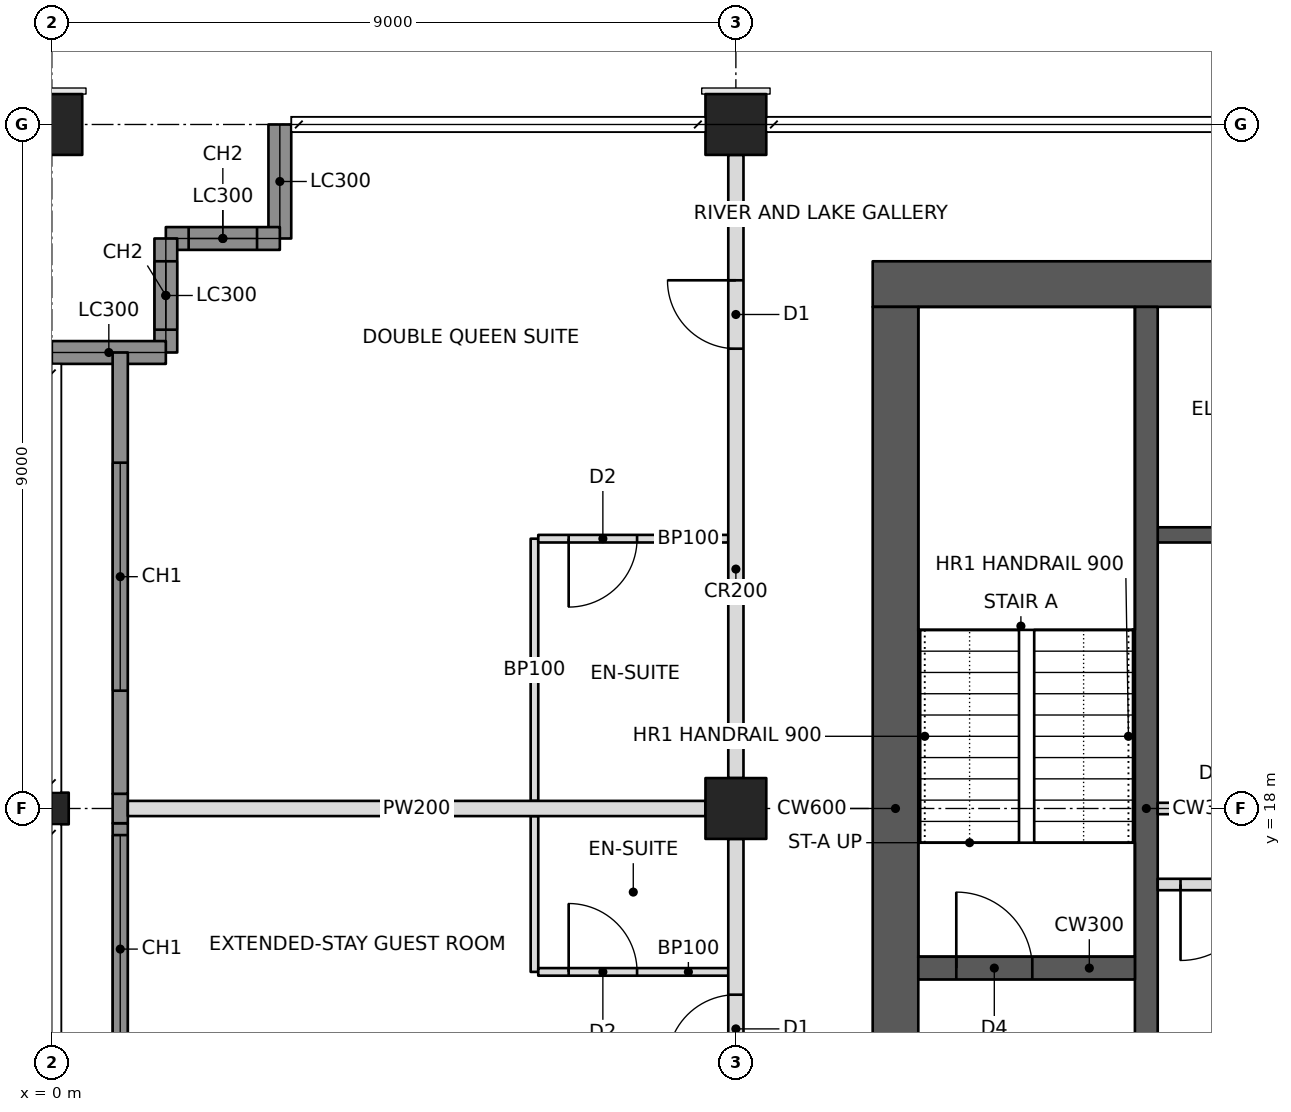
"""IFC4 building model, lengths in metres.
Left out: names, types, materials, properties, quantities, classifications, styles, units other than length and angle.
Written with IfcOpenShell. Run it as: python <this file> out.ifc"""

import sys

from ifc_helpers import new_model, si_unit, direction, frame, frame_2d, origin, origin_2d, place, context, subcontext, project, spatial, rectangle, hollow_rectangle, i_section, extrude, element, fill, save


model = new_model("IFC4")
c1 = context("Model", 3, precision=1e-05, world=origin(), true_north=direction((0.0, 1.0)))
c2 = subcontext(c1, "Body", "Model", "MODEL_VIEW")
j1 = project(units=[si_unit("LENGTHUNIT", "METRE"), si_unit("PLANEANGLEUNIT", "RADIAN")], contexts=[c1])
p1 = place(None, origin())
s1 = spatial("IfcSite", under=j1, at=p1, CompositionType="ELEMENT")
p2 = place(p1, origin())
s2 = spatial("IfcBuilding", under=s1, at=p2, CompositionType="ELEMENT")
p3 = place(p2, frame((0.0, 0.0, 255.4)))
s3 = spatial("IfcBuildingStorey", under=s2, at=p3, CompositionType="ELEMENT", Elevation=255.4)
p4 = place(p3, frame((0.0, 18.0, 0.0), z_axis=(0.0, 0.0, 1.0), x_axis=(0.0, 1.0, 0.0)))
e1 = element("IfcColumn", 1, at=p4, inside=s3, PredefinedType="COLUMN", context=c2, shape_type="SweptSolid", body=[
    extrude(i_section(OverallWidth=0.417, OverallDepth=0.445, WebThickness=0.039, FlangeThickness=0.063, at=origin_2d()), origin(), (0.0, 0.0, 1.0), 3.6),
])
for number, where, z_axis, x_axis in (
    (2, (0.0, 27.0, 0.0), (0.0, 0.0, 1.0), (0.0, 1.0, 0.0)),
    (3, (9.0, 18.0, 0.0), (0.0, 0.0, 1.0), (1.0, 0.0, 0.0)),
    (4, (9.0, 27.0, 0.0), (0.0, 0.0, 1.0), (1.0, 0.0, 0.0)),
):
    element("IfcColumn", number, at=place(p3, frame(where, z_axis=z_axis, x_axis=x_axis)), inside=s3, PredefinedType="COLUMN", context=c2, shape_type="SweptSolid", body=[
        extrude(hollow_rectangle(XDim=0.8, YDim=0.8, WallThickness=0.032, at=origin_2d()), origin(), (0.0, 0.0, 1.0), 3.6),
    ])
p5 = place(p3, frame((10.8, 24.9, 0.0), z_axis=(0.0, 0.0, 1.0), x_axis=(1.0, 0.0, 0.0)))
e5 = element("IfcWall", 5, at=p5, inside=s3, PredefinedType="SHEAR", context=c2, shape_type="SweptSolid", body=[
    extrude(rectangle(XDim=23.4, YDim=0.6, at=frame_2d((11.7, 0.0))), origin(), (0.0, 0.0, 1.0), 3.6),
])
p6 = place(p5, frame((17.2, 0.0, 0.0)))
e6 = element("IfcOpeningElement", 6, at=p6, cuts=e5, PredefinedType="OPENING", context=c2, shape_type="SweptSolid", body=[
    extrude(rectangle(XDim=1.8, YDim=2.1, at=frame_2d((0.9, 1.05))), frame((0.0, 0.31, 0.0), z_axis=(0.0, -1.0, 0.0), x_axis=(1.0, 0.0, 0.0)), (0.0, 0.0, 1.0), 0.62),
])
p7 = place(p5, frame((21.1, 0.0, 0.0)))
e7 = element("IfcOpeningElement", 7, at=p7, cuts=e5, PredefinedType="OPENING", context=c2, shape_type="SweptSolid", body=[
    extrude(rectangle(XDim=1.0, YDim=2.1, at=frame_2d((0.5, 1.05))), frame((0.0, 0.31, 0.0), z_axis=(0.0, -1.0, 0.0), x_axis=(1.0, 0.0, 0.0)), (0.0, 0.0, 1.0), 0.62),
])
p8 = place(p5, frame((4.9, 0.0, 0.0)))
e8 = element("IfcOpeningElement", 8, at=p8, cuts=e5, PredefinedType="OPENING", context=c2, shape_type="SweptSolid", body=[
    extrude(rectangle(XDim=1.0, YDim=2.1, at=frame_2d((0.5, 1.05))), frame((0.0, 0.31, 0.0), z_axis=(0.0, -1.0, 0.0), x_axis=(1.0, 0.0, 0.0)), (0.0, 0.0, 1.0), 0.62),
])
p9 = place(p3, frame((11.1, 11.4, 0.0), z_axis=(0.0, 0.0, 1.0), x_axis=(0.0, 1.0, 0.0)))
e9 = element("IfcWall", 9, at=p9, inside=s3, PredefinedType="SHEAR", context=c2, shape_type="SweptSolid", body=[
    extrude(rectangle(XDim=13.2, YDim=0.6, at=frame_2d((6.6, 0.0))), origin(), (0.0, 0.0, 1.0), 3.6),
])
p10 = place(p3, frame((14.4, 11.4, 0.0), z_axis=(0.0, 0.0, 1.0), x_axis=(0.0, 1.0, 0.0)))
e10 = element("IfcWall", 10, at=p10, inside=s3, PredefinedType="SHEAR", context=c2, shape_type="SweptSolid", body=[
    extrude(rectangle(XDim=13.2, YDim=0.3, at=frame_2d((6.6, 0.0))), origin(), (0.0, 0.0, 1.0), 3.6),
])
p11 = place(p3, frame((11.4, 15.9, 0.0), z_axis=(0.0, 0.0, 1.0), x_axis=(1.0, 0.0, 0.0)))
e11 = element("IfcWall", 11, at=p11, inside=s3, PredefinedType="SHEAR", context=c2, shape_type="SweptSolid", body=[
    extrude(rectangle(XDim=2.85, YDim=0.3, at=frame_2d((1.425, 0.0))), origin(), (0.0, 0.0, 1.0), 3.6),
])
p12 = place(p11, frame((0.5, 0.0, 0.0)))
e12 = element("IfcOpeningElement", 12, at=p12, cuts=e11, PredefinedType="OPENING", context=c2, shape_type="SweptSolid", body=[
    extrude(rectangle(XDim=1.0, YDim=2.1, at=frame_2d((0.5, 1.05))), frame((0.0, 0.16, 0.0), z_axis=(0.0, -1.0, 0.0), x_axis=(1.0, 0.0, 0.0)), (0.0, 0.0, 1.0), 0.32),
])
p13 = place(p3, frame((14.55, 18.0, 0.0), z_axis=(0.0, 0.0, 1.0), x_axis=(1.0, 0.0, 0.0)))
e13 = element("IfcWall", 13, at=p13, inside=s3, PredefinedType="PARTITIONING", context=c2, shape_type="SweptSolid", body=[
    extrude(rectangle(XDim=3.3, YDim=0.15, at=frame_2d((1.65, 0.0))), origin(), (0.0, 0.0, 1.0), 3.4),
])
p14 = place(p3, frame((14.55, 21.6, 0.0), z_axis=(0.0, 0.0, 1.0), x_axis=(1.0, 0.0, 0.0)))
e14 = element("IfcWall", 14, at=p14, inside=s3, PredefinedType="SHEAR", context=c2, shape_type="SweptSolid", body=[
    extrude(rectangle(XDim=3.3, YDim=0.2, at=frame_2d((1.65, 0.0))), origin(), (0.0, 0.0, 1.0), 3.6),
])
p15 = place(p3, frame((3.0, 27.0, 0.0), z_axis=(0.0, 0.0, 1.0), x_axis=(0.0, -1.0, 0.0)))
e15 = element("IfcWall", 15, at=p15, inside=s3, PredefinedType="SOLIDWALL", context=c2, shape_type="SweptSolid", body=[
    extrude(rectangle(XDim=1.5, YDim=0.3, at=frame_2d((0.75, 0.0))), origin(), (0.0, 0.0, 1.0), 2.62),
])
p16 = place(p3, frame((3.0, 25.5, 0.0), z_axis=(0.0, 0.0, 1.0), x_axis=(-1.0, 0.0, 0.0)))
e16 = element("IfcWall", 16, at=p16, inside=s3, PredefinedType="SOLIDWALL", context=c2, shape_type="SweptSolid", body=[
    extrude(rectangle(XDim=1.5, YDim=0.3, at=frame_2d((0.75, 0.0))), origin(), (0.0, 0.0, 1.0), 3.4),
])
p17 = place(p16, frame((0.3, 0.0, 0.6)))
e17 = element("IfcOpeningElement", 17, at=p17, cuts=e16, PredefinedType="OPENING", context=c2, shape_type="SweptSolid", body=[
    extrude(rectangle(XDim=0.9, YDim=2.2, at=frame_2d((0.45, 1.1))), frame((0.0, 0.16, 0.0), z_axis=(0.0, -1.0, 0.0), x_axis=(1.0, 0.0, 0.0)), (0.0, 0.0, 1.0), 0.32),
])
p18 = place(p3, frame((1.5, 25.5, 0.0), z_axis=(0.0, 0.0, 1.0), x_axis=(0.0, -1.0, 0.0)))
e18 = element("IfcWall", 18, at=p18, inside=s3, PredefinedType="SOLIDWALL", context=c2, shape_type="SweptSolid", body=[
    extrude(rectangle(XDim=1.5, YDim=0.3, at=frame_2d((0.75, 0.0))), origin(), (0.0, 0.0, 1.0), 3.4),
])
p19 = place(p18, frame((0.3, 0.0, 0.6)))
e19 = element("IfcOpeningElement", 19, at=p19, cuts=e18, PredefinedType="OPENING", context=c2, shape_type="SweptSolid", body=[
    extrude(rectangle(XDim=0.9, YDim=2.2, at=frame_2d((0.45, 1.1))), frame((0.0, 0.16, 0.0), z_axis=(0.0, -1.0, 0.0), x_axis=(1.0, 0.0, 0.0)), (0.0, 0.0, 1.0), 0.32),
])
p20 = place(p3, frame((1.5, 24.0, 0.0), z_axis=(0.0, 0.0, 1.0), x_axis=(-1.0, 0.0, 0.0)))
e20 = element("IfcWall", 20, at=p20, inside=s3, PredefinedType="SOLIDWALL", context=c2, shape_type="SweptSolid", body=[
    extrude(rectangle(XDim=1.5, YDim=0.3, at=frame_2d((0.75, 0.0))), origin(), (0.0, 0.0, 1.0), 2.62),
])
p21 = place(p3, frame((9.0, 10.8, 0.0), z_axis=(0.0, 0.0, 1.0), x_axis=(0.0, 1.0, 0.0)))
e21 = element("IfcWall", 21, at=p21, inside=s3, PredefinedType="PARTITIONING", context=c2, shape_type="SweptSolid", body=[
    extrude(rectangle(XDim=6.8, YDim=0.2, at=frame_2d((3.4, 0.0))), origin(), (0.0, 0.0, 1.0), 2.605),
])
p22 = place(p21, frame((0.25, 0.0, 0.0)))
e22 = element("IfcOpeningElement", 22, at=p22, cuts=e21, PredefinedType="OPENING", context=c2, shape_type="SweptSolid", body=[
    extrude(rectangle(XDim=0.9, YDim=2.1, at=frame_2d((0.45, 1.05))), frame((0.0, 0.11, 0.0), z_axis=(0.0, -1.0, 0.0), x_axis=(1.0, 0.0, 0.0)), (0.0, 0.0, 1.0), 0.22),
])
p23 = place(p21, frame((3.85, 0.0, 0.0)))
e23 = element("IfcOpeningElement", 23, at=p23, cuts=e21, PredefinedType="OPENING", context=c2, shape_type="SweptSolid", body=[
    extrude(rectangle(XDim=0.9, YDim=2.1, at=frame_2d((0.45, 1.05))), frame((0.0, 0.11, 0.0), z_axis=(0.0, -1.0, 0.0), x_axis=(1.0, 0.0, 0.0)), (0.0, 0.0, 1.0), 0.22),
])
p24 = place(p3, frame((9.0, 18.4, 0.0), z_axis=(0.0, 0.0, 1.0), x_axis=(0.0, 1.0, 0.0)))
e24 = element("IfcWall", 24, at=p24, inside=s3, PredefinedType="PARTITIONING", context=c2, shape_type="SweptSolid", body=[
    extrude(rectangle(XDim=8.2, YDim=0.2, at=frame_2d((4.1, 0.0))), origin(), (0.0, 0.0, 1.0), 2.605),
])
p25 = place(p24, frame((5.65, 0.0, 0.0)))
e25 = element("IfcOpeningElement", 25, at=p25, cuts=e24, PredefinedType="OPENING", context=c2, shape_type="SweptSolid", body=[
    extrude(rectangle(XDim=0.9, YDim=2.1, at=frame_2d((0.45, 1.05))), frame((0.0, 0.11, 0.0), z_axis=(0.0, -1.0, 0.0), x_axis=(1.0, 0.0, 0.0)), (0.0, 0.0, 1.0), 0.22),
])
p26 = place(p3, frame((8.6, 18.0, 0.0), z_axis=(0.0, 0.0, 1.0), x_axis=(-1.0, 0.0, 0.0)))
e26 = element("IfcWall", 26, at=p26, inside=s3, PredefinedType="PARTITIONING", context=c2, shape_type="SweptSolid", body=[
    extrude(rectangle(XDim=7.6, YDim=0.2, at=frame_2d((3.8, 0.0))), origin(), (0.0, 0.0, 1.0), 2.605),
])
p27 = place(p3, frame((6.35, 15.85, 0.0), z_axis=(0.0, 0.0, 1.0), x_axis=(0.0, 1.0, 0.0)))
e27 = element("IfcWall", 27, at=p27, inside=s3, PredefinedType="PARTITIONING", context=c2, shape_type="SweptSolid", body=[
    extrude(rectangle(XDim=2.05, YDim=0.1, at=frame_2d((1.025, 0.0))), origin(), (0.0, 0.0, 1.0), 2.604),
])
p28 = place(p3, frame((8.9, 15.85, 0.0), z_axis=(0.0, 0.0, 1.0), x_axis=(-1.0, 0.0, 0.0)))
e28 = element("IfcWall", 28, at=p28, inside=s3, PredefinedType="PARTITIONING", context=c2, shape_type="SweptSolid", body=[
    extrude(rectangle(XDim=2.5, YDim=0.1, at=frame_2d((1.25, 0.0))), origin(), (0.0, 0.0, 1.0), 2.604),
])
p29 = place(p28, frame((1.2, 0.0, 0.0)))
e29 = element("IfcOpeningElement", 29, at=p29, cuts=e28, PredefinedType="OPENING", context=c2, shape_type="SweptSolid", body=[
    extrude(rectangle(XDim=0.9, YDim=2.1, at=frame_2d((0.45, 1.05))), frame((0.0, 0.06, 0.0), z_axis=(0.0, -1.0, 0.0), x_axis=(1.0, 0.0, 0.0)), (0.0, 0.0, 1.0), 0.12),
])
p30 = place(p3, frame((6.35, 18.1, 0.0), z_axis=(0.0, 0.0, 1.0), x_axis=(0.0, 1.0, 0.0)))
e30 = element("IfcWall", 30, at=p30, inside=s3, PredefinedType="PARTITIONING", context=c2, shape_type="SweptSolid", body=[
    extrude(rectangle(XDim=3.45, YDim=0.1, at=frame_2d((1.725, 0.0))), origin(), (0.0, 0.0, 1.0), 2.604),
])
p31 = place(p3, frame((8.9, 21.55, 0.0), z_axis=(0.0, 0.0, 1.0), x_axis=(-1.0, 0.0, 0.0)))
e31 = element("IfcWall", 31, at=p31, inside=s3, PredefinedType="PARTITIONING", context=c2, shape_type="SweptSolid", body=[
    extrude(rectangle(XDim=2.5, YDim=0.1, at=frame_2d((1.25, 0.0))), origin(), (0.0, 0.0, 1.0), 2.604),
])
p32 = place(p31, frame((1.2, 0.0, 0.0)))
e32 = element("IfcOpeningElement", 32, at=p32, cuts=e31, PredefinedType="OPENING", context=c2, shape_type="SweptSolid", body=[
    extrude(rectangle(XDim=0.9, YDim=2.1, at=frame_2d((0.45, 1.05))), frame((0.0, 0.06, 0.0), z_axis=(0.0, -1.0, 0.0), x_axis=(1.0, 0.0, 0.0)), (0.0, 0.0, 1.0), 0.12),
])
p33 = place(p3, frame((14.55, 17.0, 0.0), z_axis=(0.0, 0.0, 1.0), x_axis=(1.0, 0.0, 0.0)))
e33 = element("IfcWall", 33, at=p33, inside=s3, PredefinedType="PARTITIONING", context=c2, shape_type="SweptSolid", body=[
    extrude(rectangle(XDim=3.3, YDim=0.15, at=frame_2d((1.65, 0.0))), origin(), (0.0, 0.0, 1.0), 3.4),
])
p34 = place(p33, frame((0.3, 0.0, 0.0)))
e34 = element("IfcOpeningElement", 34, at=p34, cuts=e33, PredefinedType="OPENING", context=c2, shape_type="SweptSolid", body=[
    extrude(rectangle(XDim=1.0, YDim=2.1, at=frame_2d((0.5, 1.05))), frame((0.0, 0.085, 0.0), z_axis=(0.0, -1.0, 0.0), x_axis=(1.0, 0.0, 0.0)), (0.0, 0.0, 1.0), 0.17),
])
p35 = place(p3, frame((0.9, 9.135, 0.0), z_axis=(0.0, 0.0, 1.0), x_axis=(0.0, 1.0, 0.0)))
e35 = element("IfcWall", 35, at=p35, inside=s3, PredefinedType="SOLIDWALL", context=c2, shape_type="SweptSolid", body=[
    extrude(rectangle(XDim=8.671, YDim=0.2, at=frame_2d((4.335, 0.0))), origin(), (0.0, 0.0, 1.0), 3.4),
])
p36 = place(p35, frame((2.015, 0.0, 0.6)))
e36 = element("IfcOpeningElement", 36, at=p36, cuts=e35, PredefinedType="OPENING", context=c2, shape_type="SweptSolid", body=[
    extrude(rectangle(XDim=3.0, YDim=2.2, at=frame_2d((1.5, 1.1))), frame((0.0, 0.11, 0.0), z_axis=(0.0, -1.0, 0.0), x_axis=(1.0, 0.0, 0.0)), (0.0, 0.0, 1.0), 0.22),
])
p37 = place(p35, frame((5.515, 0.0, 0.6)))
e37 = element("IfcOpeningElement", 37, at=p37, cuts=e35, PredefinedType="OPENING", context=c2, shape_type="SweptSolid", body=[
    extrude(rectangle(XDim=3.0, YDim=2.2, at=frame_2d((1.5, 1.1))), frame((0.0, 0.11, 0.0), z_axis=(0.0, -1.0, 0.0), x_axis=(1.0, 0.0, 0.0)), (0.0, 0.0, 1.0), 0.22),
])
p38 = place(p3, frame((0.9, 17.806, 0.0), z_axis=(0.0, 0.0, 1.0), x_axis=(0.0, 1.0, 0.0)))
e38 = element("IfcWall", 38, at=p38, inside=s3, PredefinedType="SOLIDWALL", context=c2, shape_type="SweptSolid", body=[
    extrude(rectangle(XDim=0.388, YDim=0.2, at=frame_2d((0.194, 0.0))), origin(), (0.0, 0.0, 1.0), 2.604),
])
p39 = place(p3, frame((0.9, 18.194, 0.0), z_axis=(0.0, 0.0, 1.0), x_axis=(0.0, 1.0, 0.0)))
e39 = element("IfcWall", 39, at=p39, inside=s3, PredefinedType="SOLIDWALL", context=c2, shape_type="SweptSolid", body=[
    extrude(rectangle(XDim=5.806, YDim=0.2, at=frame_2d((2.903, 0.0))), origin(), (0.0, 0.0, 1.0), 3.4),
])
p40 = place(p39, frame((1.356, 0.0, 0.6)))
e40 = element("IfcOpeningElement", 40, at=p40, cuts=e39, PredefinedType="OPENING", context=c2, shape_type="SweptSolid", body=[
    extrude(rectangle(XDim=3.0, YDim=2.2, at=frame_2d((1.5, 1.1))), frame((0.0, 0.11, 0.0), z_axis=(0.0, -1.0, 0.0), x_axis=(1.0, 0.0, 0.0)), (0.0, 0.0, 1.0), 0.22),
])
p41 = place(p17, origin())
e41 = element("IfcWindow", 41, at=p41, inside=s3, PartitioningType="SINGLE_PANEL", PredefinedType="WINDOW", context=c2, shape_type="SweptSolid", body=[
    extrude(rectangle(XDim=0.9, YDim=2.2, at=frame_2d((0.45, 1.1))), frame((0.0, 0.03, 0.0), z_axis=(0.0, -1.0, 0.0), x_axis=(1.0, 0.0, 0.0)), (0.0, 0.0, 1.0), 0.06),
])
fill(e17, e41)
p42 = place(p19, origin())
e42 = element("IfcWindow", 42, at=p42, inside=s3, PartitioningType="SINGLE_PANEL", PredefinedType="WINDOW", context=c2, shape_type="SweptSolid", body=[
    extrude(rectangle(XDim=0.9, YDim=2.2, at=frame_2d((0.45, 1.1))), frame((0.0, 0.03, 0.0), z_axis=(0.0, -1.0, 0.0), x_axis=(1.0, 0.0, 0.0)), (0.0, 0.0, 1.0), 0.06),
])
fill(e19, e42)
p43 = place(p37, origin())
e43 = element("IfcWindow", 43, at=p43, inside=s3, PartitioningType="TRIPLE_PANEL_VERTICAL", PredefinedType="WINDOW", context=c2, shape_type="SweptSolid", body=[
    extrude(rectangle(XDim=3.0, YDim=2.2, at=frame_2d((1.5, 1.1))), frame((0.0, 0.03, 0.0), z_axis=(0.0, -1.0, 0.0), x_axis=(1.0, 0.0, 0.0)), (0.0, 0.0, 1.0), 0.06),
])
fill(e37, e43)
p44 = place(p40, origin())
e44 = element("IfcWindow", 44, at=p44, inside=s3, PartitioningType="TRIPLE_PANEL_VERTICAL", PredefinedType="WINDOW", context=c2, shape_type="SweptSolid", body=[
    extrude(rectangle(XDim=3.0, YDim=2.2, at=frame_2d((1.5, 1.1))), frame((0.0, 0.03, 0.0), z_axis=(0.0, -1.0, 0.0), x_axis=(1.0, 0.0, 0.0)), (0.0, 0.0, 1.0), 0.06),
])
fill(e40, e44)
p45 = place(p29, frame((0.9, 0.0, 0.0), z_axis=(0.0, 0.0, 1.0), x_axis=(-1.0, 0.0, 0.0)))
e45 = element("IfcDoor", 45, at=p45, inside=s3, OperationType="SINGLE_SWING_LEFT", PredefinedType="DOOR", context=c2, shape_type="SweptSolid", body=[
    extrude(rectangle(XDim=0.9, YDim=2.1, at=frame_2d((0.45, 1.05))), frame((0.0, 0.025, 0.0), z_axis=(0.0, -1.0, 0.0), x_axis=(1.0, 0.0, 0.0)), (0.0, 0.0, 1.0), 0.05),
])
fill(e29, e45)
p46 = place(p23, origin())
e46 = element("IfcDoor", 46, at=p46, inside=s3, OperationType="SINGLE_SWING_LEFT", PredefinedType="DOOR", context=c2, shape_type="SweptSolid", body=[
    extrude(rectangle(XDim=0.9, YDim=2.1, at=frame_2d((0.45, 1.05))), frame((0.0, 0.025, 0.0), z_axis=(0.0, -1.0, 0.0), x_axis=(1.0, 0.0, 0.0)), (0.0, 0.0, 1.0), 0.05),
])
fill(e23, e46)
p47 = place(p32, origin())
e47 = element("IfcDoor", 47, at=p47, inside=s3, OperationType="SINGLE_SWING_RIGHT", PredefinedType="DOOR", context=c2, shape_type="SweptSolid", body=[
    extrude(rectangle(XDim=0.9, YDim=2.1, at=frame_2d((0.45, 1.05))), frame((0.0, 0.025, 0.0), z_axis=(0.0, -1.0, 0.0), x_axis=(1.0, 0.0, 0.0)), (0.0, 0.0, 1.0), 0.05),
])
fill(e32, e47)
p48 = place(p25, origin())
e48 = element("IfcDoor", 48, at=p48, inside=s3, OperationType="SINGLE_SWING_RIGHT", PredefinedType="DOOR", context=c2, shape_type="SweptSolid", body=[
    extrude(rectangle(XDim=0.9, YDim=2.1, at=frame_2d((0.45, 1.05))), frame((0.0, 0.025, 0.0), z_axis=(0.0, -1.0, 0.0), x_axis=(1.0, 0.0, 0.0)), (0.0, 0.0, 1.0), 0.05),
])
fill(e25, e48)
p49 = place(p34, frame((1.0, 0.0, 0.0), z_axis=(0.0, 0.0, 1.0), x_axis=(-1.0, 0.0, 0.0)))
e49 = element("IfcDoor", 49, at=p49, inside=s3, OperationType="SINGLE_SWING_RIGHT", PredefinedType="DOOR", context=c2, shape_type="SweptSolid", body=[
    extrude(rectangle(XDim=1.0, YDim=2.1, at=frame_2d((0.5, 1.05))), frame((0.0, 0.025, 0.0), z_axis=(0.0, -1.0, 0.0), x_axis=(1.0, 0.0, 0.0)), (0.0, 0.0, 1.0), 0.05),
])
fill(e34, e49)
p50 = place(p12, origin())
e50 = element("IfcDoor", 50, at=p50, inside=s3, OperationType="SINGLE_SWING_LEFT", PredefinedType="DOOR", context=c2, shape_type="SweptSolid", body=[
    extrude(rectangle(XDim=1.0, YDim=2.1, at=frame_2d((0.5, 1.05))), frame((0.0, 0.025, 0.0), z_axis=(0.0, -1.0, 0.0), x_axis=(1.0, 0.0, 0.0)), (0.0, 0.0, 1.0), 0.05),
])
fill(e12, e50)
save(model, sys.argv[1])
